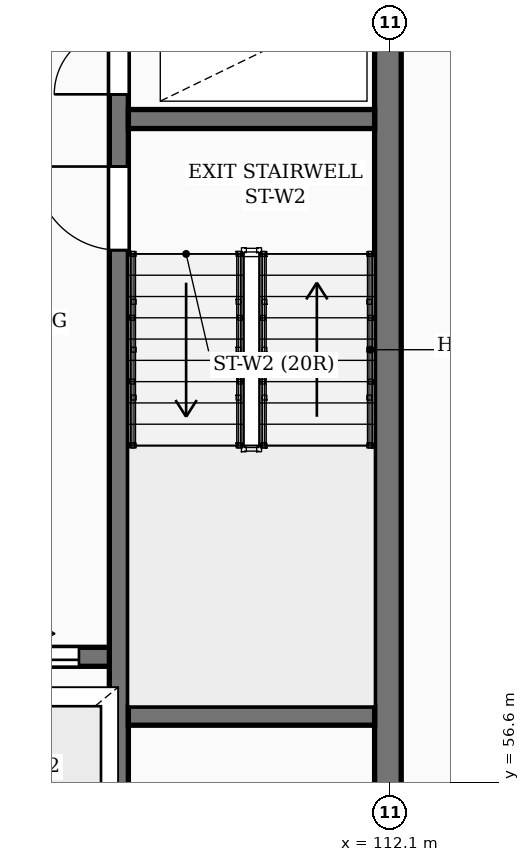
"""IFC4 building model, lengths in metres.
Left out: names, types, materials, properties, quantities, classifications, styles, units other than length and angle.
Written with IfcOpenShell. Run it as: python <this file> out.ifc"""

import sys

from ifc_helpers import new_model, si_unit, direction, frame, frame_2d, origin, place, context, subcontext, project, spatial, rectangle, extrude, element, fill, save


model = new_model("IFC4")
c1 = context("Model", 3, precision=1e-05, world=origin(), true_north=direction((0.0, 1.0)))
c2 = subcontext(c1, "Body", "Model", "MODEL_VIEW")
j1 = project(units=[si_unit("LENGTHUNIT", "METRE"), si_unit("PLANEANGLEUNIT", "RADIAN")], contexts=[c1])
p1 = place(None, origin())
s1 = spatial("IfcSite", under=j1, at=p1, CompositionType="ELEMENT")
p2 = place(p1, origin())
s2 = spatial("IfcBuilding", under=s1, at=p2, CompositionType="ELEMENT")
p3 = place(p2, frame((0.0, 0.0, -7.2)))
s3 = spatial("IfcBuildingStorey", under=s2, at=p3, CompositionType="ELEMENT", Elevation=-7.2)
p4 = place(p3, frame((112.075, 55.375, 0.0), z_axis=(0.0, 0.0, 1.0), x_axis=(0.0, 1.0, 0.0)))
e1 = element("IfcWall", 1, at=p4, inside=s3, PredefinedType="SHEAR", context=c2, shape_type="SweptSolid", body=[
    extrude(rectangle(XDim=11.65, YDim=0.35, at=frame_2d((5.825, 0.0))), origin(), (0.0, 0.0, 1.0), 3.6),
])
p5 = place(p3, frame((106.22, 58.25, 0.0), z_axis=(0.0, 0.0, 1.0), x_axis=(1.0, 0.0, 0.0)))
e2 = element("IfcWall", 2, at=p5, inside=s3, PredefinedType="SHEAR", context=c2, shape_type="SweptSolid", body=[
    extrude(rectangle(XDim=2.46, YDim=0.25, at=frame_2d((1.23, 0.0))), origin(), (0.0, 0.0, 1.0), 3.6),
])
p6 = place(p5, frame((0.67, 0.0, 0.0)))
e3 = element("IfcOpeningElement", 3, at=p6, cuts=e2, PredefinedType="OPENING", context=c2, shape_type="SweptSolid", body=[
    extrude(rectangle(XDim=1.12, YDim=2.12, at=frame_2d((0.56, 1.06))), frame((0.0, 0.135, 0.0), z_axis=(0.0, -1.0, 0.0), x_axis=(1.0, 0.0, 0.0)), (0.0, 0.0, 1.0), 0.27),
])
p7 = place(p3, frame((108.535, 55.4, 0.0), z_axis=(0.0, 0.0, 1.0), x_axis=(0.0, 1.0, 0.0)))
e4 = element("IfcWall", 4, at=p7, inside=s3, PredefinedType="SHEAR", context=c2, shape_type="SweptSolid", body=[
    extrude(rectangle(XDim=11.6, YDim=0.25, at=frame_2d((5.8, 0.0))), origin(), (0.0, 0.0, 1.0), 3.6),
])
p8 = place(p7, frame((8.2, 0.0, 0.0)))
e5 = element("IfcOpeningElement", 5, at=p8, cuts=e4, PredefinedType="OPENING", context=c2, shape_type="SweptSolid", body=[
    extrude(rectangle(XDim=1.1, YDim=2.1, at=frame_2d((0.55, 1.05))), frame((0.0, 0.135, 0.0), z_axis=(0.0, -1.0, 0.0), x_axis=(1.0, 0.0, 0.0)), (0.0, 0.0, 1.0), 0.27),
])
p9 = place(p7, frame((10.25, 0.0, 0.0)))
e6 = element("IfcOpeningElement", 6, at=p9, cuts=e4, PredefinedType="OPENING", context=c2, shape_type="SweptSolid", body=[
    extrude(rectangle(XDim=0.85, YDim=2.05, at=frame_2d((0.425, 1.025))), frame((0.0, 0.135, 0.0), z_axis=(0.0, -1.0, 0.0), x_axis=(1.0, 0.0, 0.0)), (0.0, 0.0, 1.0), 0.27),
])
for number, where, z_axis, x_axis in (
    (7, (108.66, 57.475, 0.0), (0.0, 0.0, 1.0), (1.0, 0.0, 0.0)),
    (8, (108.66, 65.325, 0.0), (0.0, 0.0, 1.0), (1.0, 0.0, 0.0)),
):
    element("IfcWall", number, at=place(p3, frame(where, z_axis=z_axis, x_axis=x_axis)), inside=s3, PredefinedType="SHEAR", context=c2, shape_type="SweptSolid", body=[
        extrude(rectangle(XDim=3.24, YDim=0.25, at=frame_2d((1.62, 0.0))), origin(), (0.0, 0.0, 1.0), 3.6),
    ])
p10 = place(p6, origin())
e9 = element("IfcDoor", 9, at=p10, inside=s3, OperationType="SLIDING_TO_RIGHT", PredefinedType="DOOR", context=c2, shape_type="SweptSolid", body=[
    extrude(rectangle(XDim=1.12, YDim=2.12, at=frame_2d((0.56, 1.06))), frame((0.0, 0.025, 0.0), z_axis=(0.0, -1.0, 0.0), x_axis=(1.0, 0.0, 0.0)), (0.0, 0.0, 1.0), 0.05),
])
fill(e3, e9)
p11 = place(p8, origin())
e10 = element("IfcDoor", 10, at=p11, inside=s3, OperationType="SINGLE_SWING_RIGHT", PredefinedType="DOOR", context=c2, shape_type="SweptSolid", body=[
    extrude(rectangle(XDim=1.1, YDim=2.1, at=frame_2d((0.55, 1.05))), frame((0.0, 0.025, 0.0), z_axis=(0.0, -1.0, 0.0), x_axis=(1.0, 0.0, 0.0)), (0.0, 0.0, 1.0), 0.05),
])
fill(e5, e10)
p12 = place(p9, origin())
e11 = element("IfcDoor", 11, at=p12, inside=s3, OperationType="SINGLE_SWING_LEFT", PredefinedType="DOOR", context=c2, shape_type="SweptSolid", body=[
    extrude(rectangle(XDim=0.85, YDim=2.05, at=frame_2d((0.425, 1.025))), frame((0.0, 0.025, 0.0), z_axis=(0.0, -1.0, 0.0), x_axis=(1.0, 0.0, 0.0)), (0.0, 0.0, 1.0), 0.05),
])
fill(e6, e11)
save(model, sys.argv[1])
